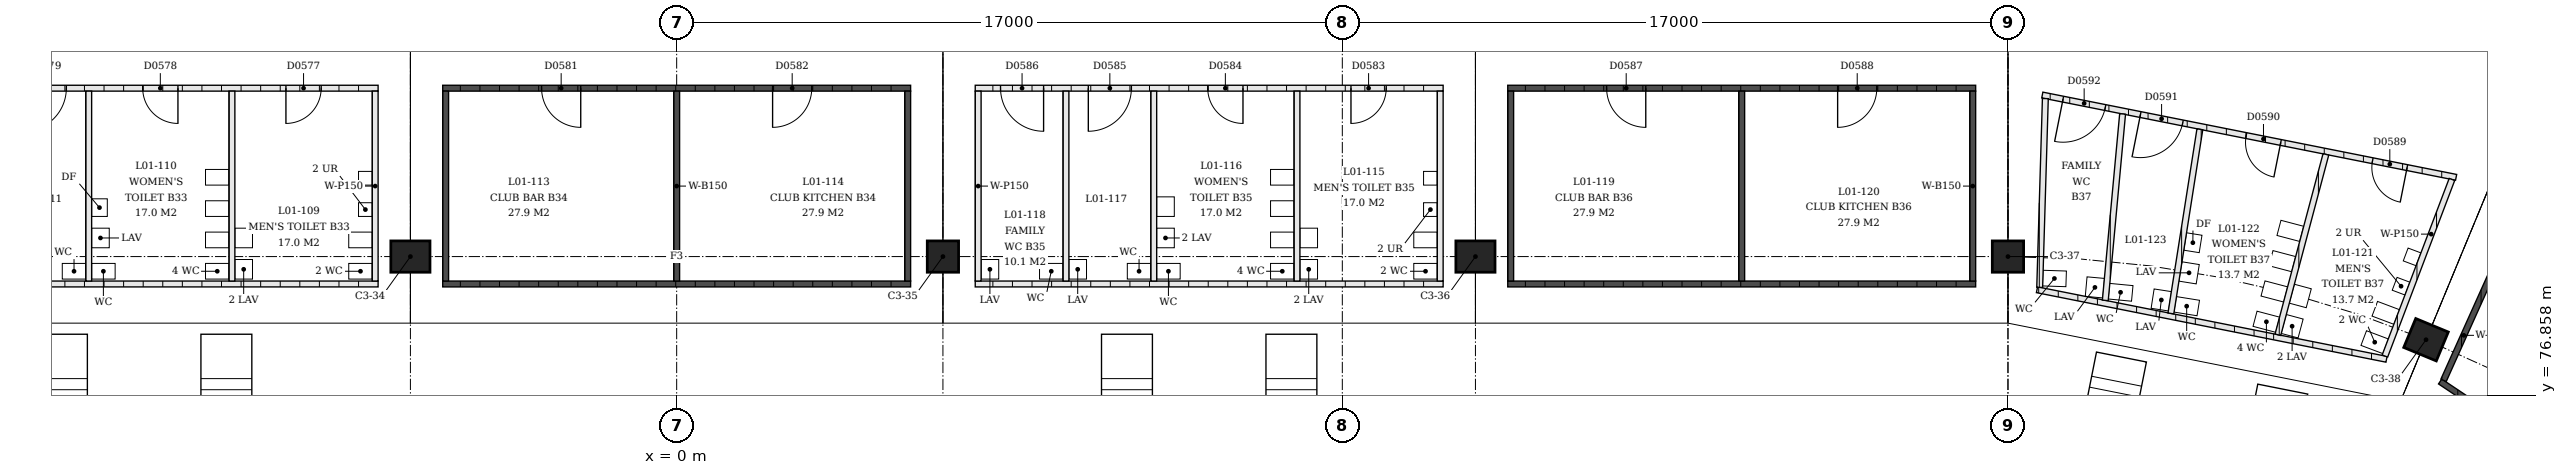
"""IFC4 building model, lengths in metres.
Left out: names, types, materials, properties, quantities, classifications, styles, units other than length and angle.
Written with IfcOpenShell. Run it as: python <this file> out.ifc"""

import sys

from ifc_helpers import new_model, si_unit, direction, frame, frame_2d, origin, origin_2d, place, context, subcontext, project, spatial, rectangle, extrude, element, fill, save


model = new_model("IFC4")
c1 = context("Model", 3, precision=1e-05, world=origin(), true_north=direction((0.0, 1.0)))
c2 = subcontext(c1, "Body", "Model", "MODEL_VIEW")
j1 = project(units=[si_unit("LENGTHUNIT", "METRE"), si_unit("PLANEANGLEUNIT", "RADIAN")], contexts=[c1])
p1 = place(None, origin())
s1 = spatial("IfcSite", under=j1, at=p1, CompositionType="ELEMENT")
p2 = place(p1, origin())
s2 = spatial("IfcBuilding", under=s1, at=p2, CompositionType="ELEMENT")
p3 = place(p2, frame((0.0, 0.0, 4.5)))
s3 = spatial("IfcBuildingStorey", under=s2, at=p3, CompositionType="ELEMENT", Elevation=4.5)
p4 = place(p3, frame((-6.8, 80.4, 0.0), z_axis=(0.0, 0.0, 1.0), x_axis=(-1.0, 0.0, 0.0)))
e1 = element("IfcColumn", 1, at=p4, inside=s3, PredefinedType="COLUMN", context=c2, shape_type="SweptSolid", body=[
    extrude(rectangle(XDim=1.0, YDim=0.8, at=origin_2d()), origin(), (0.0, 0.0, 1.0), 4.5),
])
p5 = place(p3, frame((6.8, 80.4, 0.0), z_axis=(0.0, 0.0, 1.0), x_axis=(-1.0, 0.0, 0.0)))
e2 = element("IfcColumn", 2, at=p5, inside=s3, PredefinedType="COLUMN", context=c2, shape_type="SweptSolid", body=[
    extrude(rectangle(XDim=0.8, YDim=0.8, at=origin_2d()), origin(), (0.0, 0.0, 1.0), 4.5),
])
p6 = place(p3, frame((20.4, 80.4, 0.0), z_axis=(0.0, 0.0, 1.0), x_axis=(-1.0, 0.0, 0.0)))
e3 = element("IfcColumn", 3, at=p6, inside=s3, PredefinedType="COLUMN", context=c2, shape_type="SweptSolid", body=[
    extrude(rectangle(XDim=1.0, YDim=0.8, at=origin_2d()), origin(), (0.0, 0.0, 1.0), 4.5),
])
p7 = place(p3, frame((34.0, 80.4, 0.0), z_axis=(0.0, 0.0, 1.0), x_axis=(-1.0, 0.0, 0.0)))
e4 = element("IfcColumn", 4, at=p7, inside=s3, PredefinedType="COLUMN", context=c2, shape_type="SweptSolid", body=[
    extrude(rectangle(XDim=0.8, YDim=0.8, at=origin_2d()), origin(), (0.0, 0.0, 1.0), 4.5),
])
p8 = place(p3, frame((44.677, 78.276, 0.0), z_axis=(0.0, 0.0, 1.0), x_axis=(-0.923879532511, 0.382683432365, 0.0)))
e5 = element("IfcColumn", 5, at=p8, inside=s3, PredefinedType="COLUMN", context=c2, shape_type="SweptSolid", body=[
    extrude(rectangle(XDim=0.9, YDim=0.8, at=origin_2d()), origin(), (0.0, 0.0, 1.0), 4.5),
])
p9 = place(p3, frame((-7.625, 79.7, 0.0), z_axis=(0.0, 0.0, 1.0), x_axis=(-1.0, 0.0, 0.0)))
e6 = element("IfcWall", 6, at=p9, inside=s3, PredefinedType="PARTITIONING", context=c2, shape_type="SweptSolid", body=[
    extrude(rectangle(XDim=11.95, YDim=0.15, at=frame_2d((5.975, 0.0))), origin(), (0.0, 0.0, 1.0), 3.0),
])
p10 = place(p3, frame((-7.625, 84.7, 0.0), z_axis=(0.0, 0.0, 1.0), x_axis=(-1.0, 0.0, 0.0)))
e7 = element("IfcWall", 7, at=p10, inside=s3, PredefinedType="PARTITIONING", context=c2, shape_type="SweptSolid", body=[
    extrude(rectangle(XDim=11.95, YDim=0.15, at=frame_2d((5.975, 0.0))), origin(), (0.0, 0.0, 1.0), 3.0),
])
p11 = place(p10, frame((1.454, 0.0, 0.0)))
e8 = element("IfcOpeningElement", 8, at=p11, cuts=e7, PredefinedType="OPENING", context=c2, shape_type="SweptSolid", body=[
    extrude(rectangle(XDim=0.9, YDim=2.1, at=frame_2d((0.45, 1.05))), frame((0.0, 0.075, 0.0), z_axis=(0.0, -1.0, 0.0), x_axis=(1.0, 0.0, 0.0)), (0.0, 0.0, 1.0), 0.15),
])
p12 = place(p10, frame((5.112, 0.0, 0.0)))
e9 = element("IfcOpeningElement", 9, at=p12, cuts=e7, PredefinedType="OPENING", context=c2, shape_type="SweptSolid", body=[
    extrude(rectangle(XDim=0.9, YDim=2.1, at=frame_2d((0.45, 1.05))), frame((0.0, 0.075, 0.0), z_axis=(0.0, -1.0, 0.0), x_axis=(1.0, 0.0, 0.0)), (0.0, 0.0, 1.0), 0.15),
])
p13 = place(p10, frame((7.962, 0.0, 0.0)))
e10 = element("IfcOpeningElement", 10, at=p13, cuts=e7, PredefinedType="OPENING", context=c2, shape_type="SweptSolid", body=[
    extrude(rectangle(XDim=1.1, YDim=2.1, at=frame_2d((0.55, 1.05))), frame((0.0, 0.075, 0.0), z_axis=(0.0, -1.0, 0.0), x_axis=(1.0, 0.0, 0.0)), (0.0, 0.0, 1.0), 0.15),
])
p14 = place(p10, frame((10.204, 0.0, 0.0)))
e11 = element("IfcOpeningElement", 11, at=p14, cuts=e7, PredefinedType="OPENING", context=c2, shape_type="SweptSolid", body=[
    extrude(rectangle(XDim=1.1, YDim=2.1, at=frame_2d((0.55, 1.05))), frame((0.0, 0.075, 0.0), z_axis=(0.0, -1.0, 0.0), x_axis=(1.0, 0.0, 0.0)), (0.0, 0.0, 1.0), 0.15),
])
for number, where, z_axis, x_axis in (
    (12, (-7.7, 79.775, 0.0), (0.0, 0.0, 1.0), (0.0, 1.0, 0.0)),
    (13, (-11.358, 79.775, 0.0), (0.0, 0.0, 1.0), (0.0, 1.0, 0.0)),
    (14, (-15.016, 79.775, 0.0), (0.0, 0.0, 1.0), (0.0, 1.0, 0.0)),
):
    element("IfcWall", number, at=place(p3, frame(where, z_axis=z_axis, x_axis=x_axis)), inside=s3, PredefinedType="PARTITIONING", context=c2, shape_type="SweptSolid", body=[
        extrude(rectangle(XDim=4.85, YDim=0.15, at=frame_2d((2.425, 0.0))), origin(), (0.0, 0.0, 1.0), 3.0),
    ])
p15 = place(p3, frame((-5.975, 79.7, 0.0), z_axis=(0.0, 0.0, 1.0), x_axis=(1.0, 0.0, 0.0)))
e15 = element("IfcWall", 15, at=p15, inside=s3, PredefinedType="SOLIDWALL", context=c2, shape_type="SweptSolid", body=[
    extrude(rectangle(XDim=11.95, YDim=0.15, at=frame_2d((5.975, 0.0))), origin(), (0.0, 0.0, 1.0), 3.0),
])
p16 = place(p3, frame((-5.975, 84.7, 0.0), z_axis=(0.0, 0.0, 1.0), x_axis=(1.0, 0.0, 0.0)))
e16 = element("IfcWall", 16, at=p16, inside=s3, PredefinedType="SOLIDWALL", context=c2, shape_type="SweptSolid", body=[
    extrude(rectangle(XDim=11.95, YDim=0.15, at=frame_2d((5.975, 0.0))), origin(), (0.0, 0.0, 1.0), 3.0),
])
p17 = place(p16, frame((2.525, 0.0, 0.0)))
e17 = element("IfcOpeningElement", 17, at=p17, cuts=e16, PredefinedType="OPENING", context=c2, shape_type="SweptSolid", body=[
    extrude(rectangle(XDim=1.0, YDim=2.1, at=frame_2d((0.5, 1.05))), frame((0.0, 0.075, 0.0), z_axis=(0.0, -1.0, 0.0), x_axis=(1.0, 0.0, 0.0)), (0.0, 0.0, 1.0), 0.15),
])
p18 = place(p16, frame((8.425, 0.0, 0.0)))
e18 = element("IfcOpeningElement", 18, at=p18, cuts=e16, PredefinedType="OPENING", context=c2, shape_type="SweptSolid", body=[
    extrude(rectangle(XDim=1.0, YDim=2.1, at=frame_2d((0.5, 1.05))), frame((0.0, 0.075, 0.0), z_axis=(0.0, -1.0, 0.0), x_axis=(1.0, 0.0, 0.0)), (0.0, 0.0, 1.0), 0.15),
])
for number, where, z_axis, x_axis in (
    (19, (-5.9, 79.775, 0.0), (0.0, 0.0, 1.0), (0.0, 1.0, 0.0)),
    (20, (0.0, 79.775, 0.0), (0.0, 0.0, 1.0), (0.0, 1.0, 0.0)),
    (21, (5.9, 79.775, 0.0), (0.0, 0.0, 1.0), (0.0, 1.0, 0.0)),
):
    element("IfcWall", number, at=place(p3, frame(where, z_axis=z_axis, x_axis=x_axis)), inside=s3, PredefinedType="SOLIDWALL", context=c2, shape_type="SweptSolid", body=[
        extrude(rectangle(XDim=4.85, YDim=0.15, at=frame_2d((2.425, 0.0))), origin(), (0.0, 0.0, 1.0), 3.0),
    ])
p19 = place(p3, frame((19.575, 79.7, 0.0), z_axis=(0.0, 0.0, 1.0), x_axis=(-1.0, 0.0, 0.0)))
e22 = element("IfcWall", 22, at=p19, inside=s3, PredefinedType="PARTITIONING", context=c2, shape_type="SweptSolid", body=[
    extrude(rectangle(XDim=11.95, YDim=0.15, at=frame_2d((5.975, 0.0))), origin(), (0.0, 0.0, 1.0), 3.0),
])
p20 = place(p3, frame((19.575, 84.7, 0.0), z_axis=(0.0, 0.0, 1.0), x_axis=(-1.0, 0.0, 0.0)))
e23 = element("IfcWall", 23, at=p20, inside=s3, PredefinedType="PARTITIONING", context=c2, shape_type="SweptSolid", body=[
    extrude(rectangle(XDim=11.95, YDim=0.15, at=frame_2d((5.975, 0.0))), origin(), (0.0, 0.0, 1.0), 3.0),
])
p21 = place(p20, frame((1.454, 0.0, 0.0)))
e24 = element("IfcOpeningElement", 24, at=p21, cuts=e23, PredefinedType="OPENING", context=c2, shape_type="SweptSolid", body=[
    extrude(rectangle(XDim=0.9, YDim=2.1, at=frame_2d((0.45, 1.05))), frame((0.0, 0.075, 0.0), z_axis=(0.0, -1.0, 0.0), x_axis=(1.0, 0.0, 0.0)), (0.0, 0.0, 1.0), 0.15),
])
p22 = place(p20, frame((5.112, 0.0, 0.0)))
e25 = element("IfcOpeningElement", 25, at=p22, cuts=e23, PredefinedType="OPENING", context=c2, shape_type="SweptSolid", body=[
    extrude(rectangle(XDim=0.9, YDim=2.1, at=frame_2d((0.45, 1.05))), frame((0.0, 0.075, 0.0), z_axis=(0.0, -1.0, 0.0), x_axis=(1.0, 0.0, 0.0)), (0.0, 0.0, 1.0), 0.15),
])
p23 = place(p20, frame((7.962, 0.0, 0.0)))
e26 = element("IfcOpeningElement", 26, at=p23, cuts=e23, PredefinedType="OPENING", context=c2, shape_type="SweptSolid", body=[
    extrude(rectangle(XDim=1.1, YDim=2.1, at=frame_2d((0.55, 1.05))), frame((0.0, 0.075, 0.0), z_axis=(0.0, -1.0, 0.0), x_axis=(1.0, 0.0, 0.0)), (0.0, 0.0, 1.0), 0.15),
])
p24 = place(p20, frame((10.204, 0.0, 0.0)))
e27 = element("IfcOpeningElement", 27, at=p24, cuts=e23, PredefinedType="OPENING", context=c2, shape_type="SweptSolid", body=[
    extrude(rectangle(XDim=1.1, YDim=2.1, at=frame_2d((0.55, 1.05))), frame((0.0, 0.075, 0.0), z_axis=(0.0, -1.0, 0.0), x_axis=(1.0, 0.0, 0.0)), (0.0, 0.0, 1.0), 0.15),
])
for number, where, z_axis, x_axis in (
    (28, (19.5, 79.775, 0.0), (0.0, 0.0, 1.0), (0.0, 1.0, 0.0)),
    (29, (15.842, 79.775, 0.0), (0.0, 0.0, 1.0), (0.0, 1.0, 0.0)),
    (30, (12.184, 79.775, 0.0), (0.0, 0.0, 1.0), (0.0, 1.0, 0.0)),
    (31, (9.942, 79.775, 0.0), (0.0, 0.0, 1.0), (0.0, 1.0, 0.0)),
    (32, (7.7, 79.775, 0.0), (0.0, 0.0, 1.0), (0.0, 1.0, 0.0)),
):
    element("IfcWall", number, at=place(p3, frame(where, z_axis=z_axis, x_axis=x_axis)), inside=s3, PredefinedType="PARTITIONING", context=c2, shape_type="SweptSolid", body=[
        extrude(rectangle(XDim=4.85, YDim=0.15, at=frame_2d((2.425, 0.0))), origin(), (0.0, 0.0, 1.0), 3.0),
    ])
p25 = place(p3, frame((21.225, 79.7, 0.0), z_axis=(0.0, 0.0, 1.0), x_axis=(1.0, 0.0, 0.0)))
e33 = element("IfcWall", 33, at=p25, inside=s3, PredefinedType="SOLIDWALL", context=c2, shape_type="SweptSolid", body=[
    extrude(rectangle(XDim=11.95, YDim=0.15, at=frame_2d((5.975, 0.0))), origin(), (0.0, 0.0, 1.0), 3.0),
])
p26 = place(p3, frame((21.225, 84.7, 0.0), z_axis=(0.0, 0.0, 1.0), x_axis=(1.0, 0.0, 0.0)))
e34 = element("IfcWall", 34, at=p26, inside=s3, PredefinedType="SOLIDWALL", context=c2, shape_type="SweptSolid", body=[
    extrude(rectangle(XDim=11.95, YDim=0.15, at=frame_2d((5.975, 0.0))), origin(), (0.0, 0.0, 1.0), 3.0),
])
p27 = place(p26, frame((2.525, 0.0, 0.0)))
e35 = element("IfcOpeningElement", 35, at=p27, cuts=e34, PredefinedType="OPENING", context=c2, shape_type="SweptSolid", body=[
    extrude(rectangle(XDim=1.0, YDim=2.1, at=frame_2d((0.5, 1.05))), frame((0.0, 0.075, 0.0), z_axis=(0.0, -1.0, 0.0), x_axis=(1.0, 0.0, 0.0)), (0.0, 0.0, 1.0), 0.15),
])
p28 = place(p26, frame((8.425, 0.0, 0.0)))
e36 = element("IfcOpeningElement", 36, at=p28, cuts=e34, PredefinedType="OPENING", context=c2, shape_type="SweptSolid", body=[
    extrude(rectangle(XDim=1.0, YDim=2.1, at=frame_2d((0.5, 1.05))), frame((0.0, 0.075, 0.0), z_axis=(0.0, -1.0, 0.0), x_axis=(1.0, 0.0, 0.0)), (0.0, 0.0, 1.0), 0.15),
])
for number, where, z_axis, x_axis in (
    (37, (21.3, 79.775, 0.0), (0.0, 0.0, 1.0), (0.0, 1.0, 0.0)),
    (38, (27.2, 79.775, 0.0), (0.0, 0.0, 1.0), (0.0, 1.0, 0.0)),
    (39, (33.1, 79.775, 0.0), (0.0, 0.0, 1.0), (0.0, 1.0, 0.0)),
):
    element("IfcWall", number, at=place(p3, frame(where, z_axis=z_axis, x_axis=x_axis)), inside=s3, PredefinedType="SOLIDWALL", context=c2, shape_type="SweptSolid", body=[
        extrude(rectangle(XDim=4.85, YDim=0.15, at=frame_2d((2.425, 0.0))), origin(), (0.0, 0.0, 1.0), 3.0),
    ])
p29 = place(p3, frame((43.668, 77.777, 0.0), z_axis=(0.0, 0.0, 1.0), x_axis=(-0.980786464492, 0.195084369103, 0.0)))
e40 = element("IfcWall", 40, at=p29, inside=s3, PredefinedType="PARTITIONING", context=c2, shape_type="SweptSolid", body=[
    extrude(rectangle(XDim=9.102, YDim=0.15, at=frame_2d((4.551, 0.0))), origin(), (0.0, 0.0, 1.0), 3.0),
])
p30 = place(p3, frame((45.445, 82.423, 0.0), z_axis=(0.0, 0.0, 1.0), x_axis=(-0.98078580384, 0.195087690502, 0.0)))
e41 = element("IfcWall", 41, at=p30, inside=s3, PredefinedType="PARTITIONING", context=c2, shape_type="SweptSolid", body=[
    extrude(rectangle(XDim=10.775, YDim=0.15, at=frame_2d((5.387, 0.0))), origin(), (0.0, 0.0, 1.0), 3.0),
])
p31 = place(p30, frame((1.276, 0.0, 0.0)))
e42 = element("IfcOpeningElement", 42, at=p31, cuts=e41, PredefinedType="OPENING", context=c2, shape_type="SweptSolid", body=[
    extrude(rectangle(XDim=0.9, YDim=2.1, at=frame_2d((0.45, 1.05))), frame((0.0, 0.075, 0.0), z_axis=(0.0, -1.0, 0.0), x_axis=(1.0, 0.0, 0.0)), (0.0, 0.0, 1.0), 0.15),
])
p32 = place(p30, frame((4.566, 0.0, 0.0)))
e43 = element("IfcOpeningElement", 43, at=p32, cuts=e41, PredefinedType="OPENING", context=c2, shape_type="SweptSolid", body=[
    extrude(rectangle(XDim=0.9, YDim=2.1, at=frame_2d((0.45, 1.05))), frame((0.0, 0.075, 0.0), z_axis=(0.0, -1.0, 0.0), x_axis=(1.0, 0.0, 0.0)), (0.0, 0.0, 1.0), 0.15),
])
p33 = place(p30, frame((7.119, 0.0, 0.0)))
e44 = element("IfcOpeningElement", 44, at=p33, cuts=e41, PredefinedType="OPENING", context=c2, shape_type="SweptSolid", body=[
    extrude(rectangle(XDim=1.1, YDim=2.1, at=frame_2d((0.55, 1.05))), frame((0.0, 0.075, 0.0), z_axis=(0.0, -1.0, 0.0), x_axis=(1.0, 0.0, 0.0)), (0.0, 0.0, 1.0), 0.15),
])
p34 = place(p30, frame((9.135, 0.0, 0.0)))
e45 = element("IfcOpeningElement", 45, at=p34, cuts=e41, PredefinedType="OPENING", context=c2, shape_type="SweptSolid", body=[
    extrude(rectangle(XDim=1.1, YDim=2.1, at=frame_2d((0.55, 1.05))), frame((0.0, 0.075, 0.0), z_axis=(0.0, -1.0, 0.0), x_axis=(1.0, 0.0, 0.0)), (0.0, 0.0, 1.0), 0.15),
])
p35 = place(p3, frame((43.627, 77.86, 0.0), z_axis=(0.0, 0.0, 1.0), x_axis=(0.354909029819, 0.934900839957, 0.0)))
e46 = element("IfcWall", 46, at=p35, inside=s3, PredefinedType="PARTITIONING", context=c2, shape_type="SweptSolid", body=[
    extrude(rectangle(XDim=4.823, YDim=0.15, at=frame_2d((2.412, 0.0))), origin(), (0.0, 0.0, 1.0), 3.0),
])
p36 = place(p3, frame((40.894, 78.404, 0.0), z_axis=(0.0, 0.0, 1.0), x_axis=(0.257187590259, 0.966361497276, 0.0)))
e47 = element("IfcWall", 47, at=p36, inside=s3, PredefinedType="PARTITIONING", context=c2, shape_type="SweptSolid", body=[
    extrude(rectangle(XDim=4.766, YDim=0.15, at=frame_2d((2.383, 0.0))), origin(), (0.0, 0.0, 1.0), 3.0),
])
p37 = place(p3, frame((38.161, 78.947, 0.0), z_axis=(0.0, 0.0, 1.0), x_axis=(0.155385827215, 0.987853857967, 0.0)))
e48 = element("IfcWall", 48, at=p37, inside=s3, PredefinedType="PARTITIONING", context=c2, shape_type="SweptSolid", body=[
    extrude(rectangle(XDim=4.761, YDim=0.15, at=frame_2d((2.38, 0.0))), origin(), (0.0, 0.0, 1.0), 3.0),
])
p38 = place(p3, frame((36.486, 79.281, 0.0), z_axis=(0.0, 0.0, 1.0), x_axis=(0.092395037313, 0.995722429736, 0.0)))
e49 = element("IfcWall", 49, at=p38, inside=s3, PredefinedType="PARTITIONING", context=c2, shape_type="SweptSolid", body=[
    extrude(rectangle(XDim=4.783, YDim=0.15, at=frame_2d((2.391, 0.0))), origin(), (0.0, 0.0, 1.0), 3.0),
])
p39 = place(p3, frame((34.811, 79.614, 0.0), z_axis=(0.0, 0.0, 1.0), x_axis=(0.02991368842, 0.999552485488, 0.0)))
e50 = element("IfcWall", 50, at=p39, inside=s3, PredefinedType="PARTITIONING", context=c2, shape_type="SweptSolid", body=[
    extrude(rectangle(XDim=4.823, YDim=0.15, at=frame_2d((2.412, 0.0))), origin(), (0.0, 0.0, 1.0), 3.0),
])
p40 = place(p3, frame((45.037, 77.21, 0.0), z_axis=(0.0, 0.0, 1.0), x_axis=(0.83146970134, -0.555570099766, 0.0)))
e51 = element("IfcWall", 51, at=p40, inside=s3, PredefinedType="SOLIDWALL", context=c2, shape_type="SweptSolid", body=[
    extrude(rectangle(XDim=9.388, YDim=0.15, at=frame_2d((4.694, 0.0))), origin(), (0.0, 0.0, 1.0), 3.0),
])
p41 = place(p3, frame((45.125, 77.24, 0.0), z_axis=(0.0, 0.0, 1.0), x_axis=(0.410107887306, 0.912037017215, 0.0)))
e52 = element("IfcWall", 52, at=p41, inside=s3, PredefinedType="SOLIDWALL", context=c2, shape_type="SweptSolid", body=[
    extrude(rectangle(XDim=4.823, YDim=0.15, at=frame_2d((2.412, 0.0))), origin(), (0.0, 0.0, 1.0), 3.0),
])
p42 = place(p11, origin())
e53 = element("IfcDoor", 53, at=p42, inside=s3, OperationType="SINGLE_SWING_LEFT", PredefinedType="DOOR", context=c2, shape_type="SweptSolid", body=[
    extrude(rectangle(XDim=0.9, YDim=2.1, at=frame_2d((0.45, 1.05))), frame((0.0, 0.025, 0.0), z_axis=(0.0, -1.0, 0.0), x_axis=(1.0, 0.0, 0.0)), (0.0, 0.0, 1.0), 0.05),
])
fill(e8, e53)
p43 = place(p12, origin())
e54 = element("IfcDoor", 54, at=p43, inside=s3, OperationType="SINGLE_SWING_RIGHT", PredefinedType="DOOR", context=c2, shape_type="SweptSolid", body=[
    extrude(rectangle(XDim=0.9, YDim=2.1, at=frame_2d((0.45, 1.05))), frame((0.0, 0.025, 0.0), z_axis=(0.0, -1.0, 0.0), x_axis=(1.0, 0.0, 0.0)), (0.0, 0.0, 1.0), 0.05),
])
fill(e9, e54)
p44 = place(p13, origin())
e55 = element("IfcDoor", 55, at=p44, inside=s3, OperationType="SINGLE_SWING_LEFT", PredefinedType="DOOR", context=c2, shape_type="SweptSolid", body=[
    extrude(rectangle(XDim=1.1, YDim=2.1, at=frame_2d((0.55, 1.05))), frame((0.0, 0.025, 0.0), z_axis=(0.0, -1.0, 0.0), x_axis=(1.0, 0.0, 0.0)), (0.0, 0.0, 1.0), 0.05),
])
fill(e10, e55)
p45 = place(p17, origin())
e56 = element("IfcDoor", 56, at=p45, inside=s3, OperationType="SINGLE_SWING_RIGHT", PredefinedType="DOOR", context=c2, shape_type="SweptSolid", body=[
    extrude(rectangle(XDim=1.0, YDim=2.1, at=frame_2d((0.5, 1.05))), frame((0.0, 0.025, 0.0), z_axis=(0.0, -1.0, 0.0), x_axis=(1.0, 0.0, 0.0)), (0.0, 0.0, 1.0), 0.05),
])
fill(e17, e56)
p46 = place(p18, origin())
e57 = element("IfcDoor", 57, at=p46, inside=s3, OperationType="SINGLE_SWING_LEFT", PredefinedType="DOOR", context=c2, shape_type="SweptSolid", body=[
    extrude(rectangle(XDim=1.0, YDim=2.1, at=frame_2d((0.5, 1.05))), frame((0.0, 0.025, 0.0), z_axis=(0.0, -1.0, 0.0), x_axis=(1.0, 0.0, 0.0)), (0.0, 0.0, 1.0), 0.05),
])
fill(e18, e57)
p47 = place(p21, origin())
e58 = element("IfcDoor", 58, at=p47, inside=s3, OperationType="SINGLE_SWING_LEFT", PredefinedType="DOOR", context=c2, shape_type="SweptSolid", body=[
    extrude(rectangle(XDim=0.9, YDim=2.1, at=frame_2d((0.45, 1.05))), frame((0.0, 0.025, 0.0), z_axis=(0.0, -1.0, 0.0), x_axis=(1.0, 0.0, 0.0)), (0.0, 0.0, 1.0), 0.05),
])
fill(e24, e58)
p48 = place(p22, origin())
e59 = element("IfcDoor", 59, at=p48, inside=s3, OperationType="SINGLE_SWING_RIGHT", PredefinedType="DOOR", context=c2, shape_type="SweptSolid", body=[
    extrude(rectangle(XDim=0.9, YDim=2.1, at=frame_2d((0.45, 1.05))), frame((0.0, 0.025, 0.0), z_axis=(0.0, -1.0, 0.0), x_axis=(1.0, 0.0, 0.0)), (0.0, 0.0, 1.0), 0.05),
])
fill(e25, e59)
p49 = place(p23, origin())
e60 = element("IfcDoor", 60, at=p49, inside=s3, OperationType="SINGLE_SWING_LEFT", PredefinedType="DOOR", context=c2, shape_type="SweptSolid", body=[
    extrude(rectangle(XDim=1.1, YDim=2.1, at=frame_2d((0.55, 1.05))), frame((0.0, 0.025, 0.0), z_axis=(0.0, -1.0, 0.0), x_axis=(1.0, 0.0, 0.0)), (0.0, 0.0, 1.0), 0.05),
])
fill(e26, e60)
p50 = place(p24, origin())
e61 = element("IfcDoor", 61, at=p50, inside=s3, OperationType="SINGLE_SWING_RIGHT", PredefinedType="DOOR", context=c2, shape_type="SweptSolid", body=[
    extrude(rectangle(XDim=1.1, YDim=2.1, at=frame_2d((0.55, 1.05))), frame((0.0, 0.025, 0.0), z_axis=(0.0, -1.0, 0.0), x_axis=(1.0, 0.0, 0.0)), (0.0, 0.0, 1.0), 0.05),
])
fill(e27, e61)
p51 = place(p27, origin())
e62 = element("IfcDoor", 62, at=p51, inside=s3, OperationType="SINGLE_SWING_RIGHT", PredefinedType="DOOR", context=c2, shape_type="SweptSolid", body=[
    extrude(rectangle(XDim=1.0, YDim=2.1, at=frame_2d((0.5, 1.05))), frame((0.0, 0.025, 0.0), z_axis=(0.0, -1.0, 0.0), x_axis=(1.0, 0.0, 0.0)), (0.0, 0.0, 1.0), 0.05),
])
fill(e35, e62)
p52 = place(p28, origin())
e63 = element("IfcDoor", 63, at=p52, inside=s3, OperationType="SINGLE_SWING_LEFT", PredefinedType="DOOR", context=c2, shape_type="SweptSolid", body=[
    extrude(rectangle(XDim=1.0, YDim=2.1, at=frame_2d((0.5, 1.05))), frame((0.0, 0.025, 0.0), z_axis=(0.0, -1.0, 0.0), x_axis=(1.0, 0.0, 0.0)), (0.0, 0.0, 1.0), 0.05),
])
fill(e36, e63)
p53 = place(p31, origin())
e64 = element("IfcDoor", 64, at=p53, inside=s3, OperationType="SINGLE_SWING_RIGHT", PredefinedType="DOOR", context=c2, shape_type="SweptSolid", body=[
    extrude(rectangle(XDim=0.9, YDim=2.1, at=frame_2d((0.45, 1.05))), frame((0.0, 0.025, 0.0), z_axis=(0.0, -1.0, 0.0), x_axis=(1.0, 0.0, 0.0)), (0.0, 0.0, 1.0), 0.05),
])
fill(e42, e64)
p54 = place(p32, origin())
e65 = element("IfcDoor", 65, at=p54, inside=s3, OperationType="SINGLE_SWING_RIGHT", PredefinedType="DOOR", context=c2, shape_type="SweptSolid", body=[
    extrude(rectangle(XDim=0.9, YDim=2.1, at=frame_2d((0.45, 1.05))), frame((0.0, 0.025, 0.0), z_axis=(0.0, -1.0, 0.0), x_axis=(1.0, 0.0, 0.0)), (0.0, 0.0, 1.0), 0.05),
])
fill(e43, e65)
p55 = place(p33, origin())
e66 = element("IfcDoor", 66, at=p55, inside=s3, OperationType="SINGLE_SWING_LEFT", PredefinedType="DOOR", context=c2, shape_type="SweptSolid", body=[
    extrude(rectangle(XDim=1.1, YDim=2.1, at=frame_2d((0.55, 1.05))), frame((0.0, 0.025, 0.0), z_axis=(0.0, -1.0, 0.0), x_axis=(1.0, 0.0, 0.0)), (0.0, 0.0, 1.0), 0.05),
])
fill(e44, e66)
p56 = place(p34, origin())
e67 = element("IfcDoor", 67, at=p56, inside=s3, OperationType="SINGLE_SWING_LEFT", PredefinedType="DOOR", context=c2, shape_type="SweptSolid", body=[
    extrude(rectangle(XDim=1.1, YDim=2.1, at=frame_2d((0.55, 1.05))), frame((0.0, 0.025, 0.0), z_axis=(0.0, -1.0, 0.0), x_axis=(1.0, 0.0, 0.0)), (0.0, 0.0, 1.0), 0.05),
])
fill(e45, e67)
save(model, sys.argv[1])
